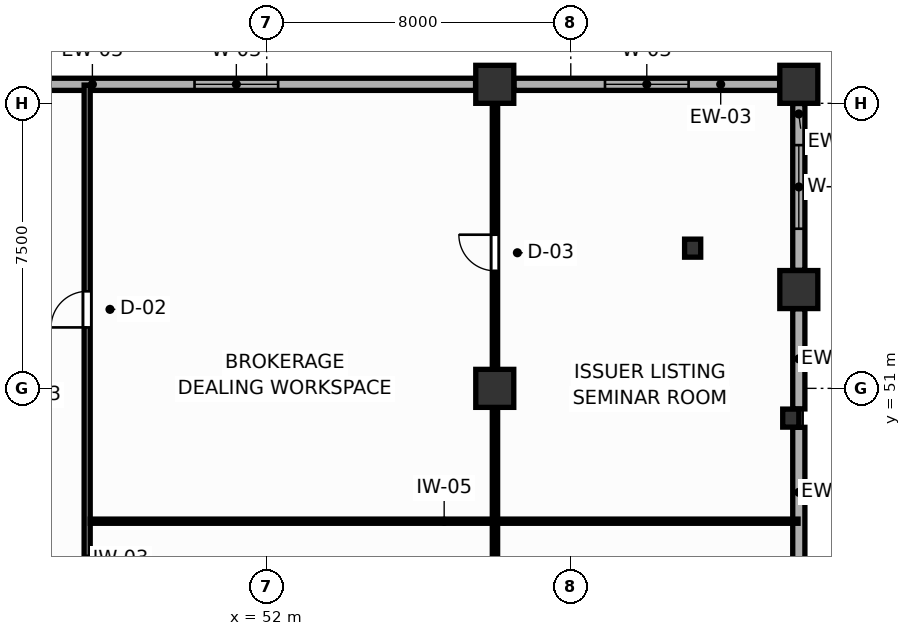
"""IFC4 building model, lengths in metres.
Left out: names, types, materials, properties, quantities, classifications, styles, units other than length and angle.
Written with IfcOpenShell. Run it as: python <this file> out.ifc"""

import sys

from ifc_helpers import new_model, si_unit, direction, frame, frame_2d, origin, origin_2d, place, context, subcontext, project, spatial, rectangle, i_section, extrude, source, transform, mapped, element, fill, save


model = new_model("IFC4")
c1 = context("Model", 3, precision=1e-05, world=origin(), true_north=direction((0.0, 1.0)))
c2 = subcontext(c1, "Body", "Model", "MODEL_VIEW")
j1 = project(units=[si_unit("LENGTHUNIT", "METRE"), si_unit("PLANEANGLEUNIT", "RADIAN")], contexts=[c1])
p1 = place(None, origin())
s1 = spatial("IfcSite", under=j1, at=p1, CompositionType="ELEMENT")
p2 = place(p1, origin())
s2 = spatial("IfcBuilding", under=s1, at=p2, CompositionType="ELEMENT")
p3 = place(p2, frame((0.0, 0.0, 9.6)))
s3 = spatial("IfcBuildingStorey", under=s2, at=p3, CompositionType="ELEMENT", Elevation=9.6)
m1 = source(origin(), c2, "Body", "SweptSolid", [
    extrude(rectangle(XDim=1.0, YDim=1.0, at=origin_2d()), origin(), (0.0, 0.0, 1.0), 4.8),
])
for number, where, z_axis, x_axis in (
    (1, (66.0, 53.6, 0.0), (0.0, 0.0, 1.0), (1.0, 0.0, 0.0)),
    (2, (66.0, 59.0, 0.0), (0.0, 0.0, 1.0), (1.0, 0.0, 0.0)),
    (3, (58.0, 59.0, 0.0), (0.0, 0.0, 1.0), (1.0, 0.0, 0.0)),
    (4, (58.0, 51.0, 0.0), (0.0, 0.0, 1.0), (1.0, 0.0, 0.0)),
):
    element("IfcColumn", number, at=place(p3, frame(where, z_axis=z_axis, x_axis=x_axis)), inside=s3, PredefinedType="COLUMN", context=c2, shape_type="MappedRepresentation", body=[
        mapped(m1, transform((0.0, 0.0, 0.0), scale=1.0)),
    ])
m2 = source(origin(), c2, "Body", "SweptSolid", [
    extrude(i_section(OverallWidth=0.424, OverallDepth=0.474, WebThickness=0.045, FlangeThickness=0.072, FilletRadius=0.015, at=origin_2d()), origin(), (0.0, 0.0, 1.0), 4.8),
])
for number, where, z_axis, x_axis in (
    (5, (65.789, 50.217, 0.0), (0.0, 0.0, 1.0), (1.0, 0.0, 0.0)),
    (6, (63.207, 54.689, 0.0), (0.0, 0.0, 1.0), (1.0, 0.0, 0.0)),
):
    element("IfcColumn", number, at=place(p3, frame(where, z_axis=z_axis, x_axis=x_axis)), inside=s3, PredefinedType="COLUMN", context=c2, shape_type="MappedRepresentation", body=[
        mapped(m2, transform((0.0, 0.0, 0.0), scale=1.0)),
    ])
p4 = place(p3, frame((44.905, 59.0, 0.0), z_axis=(0.0, 0.0, 1.0), x_axis=(1.0, 0.0, 0.0)))
e7 = element("IfcWall", 7, at=p4, inside=s3, PredefinedType="SOLIDWALL", context=c2, shape_type="SweptSolid", body=[
    extrude(rectangle(XDim=12.59, YDim=0.32, at=frame_2d((6.295, 0.0))), origin(), (0.0, 0.0, 1.0), 3.65),
])
p5 = place(p4, frame((5.195, 0.0, 0.75)))
e8 = element("IfcOpeningElement", 8, at=p5, cuts=e7, PredefinedType="OPENING", context=c2, shape_type="SweptSolid", body=[
    extrude(rectangle(XDim=2.2, YDim=2.0, at=frame_2d((1.1, 1.0))), frame((0.0, 0.17, 0.0), z_axis=(0.0, -1.0, 0.0), x_axis=(1.0, 0.0, 0.0)), (0.0, 0.0, 1.0), 0.34),
])
p6 = place(p3, frame((58.505, 59.0, 0.0), z_axis=(0.0, 0.0, 1.0), x_axis=(1.0, 0.0, 0.0)))
e9 = element("IfcWall", 9, at=p6, inside=s3, PredefinedType="SOLIDWALL", context=c2, shape_type="SweptSolid", body=[
    extrude(rectangle(XDim=6.99, YDim=0.32, at=frame_2d((3.495, 0.0))), origin(), (0.0, 0.0, 1.0), 3.65),
])
p7 = place(p6, frame((2.395, 0.0, 0.75)))
e10 = element("IfcOpeningElement", 10, at=p7, cuts=e9, PredefinedType="OPENING", context=c2, shape_type="SweptSolid", body=[
    extrude(rectangle(XDim=2.2, YDim=2.0, at=frame_2d((1.1, 1.0))), frame((0.0, 0.17, 0.0), z_axis=(0.0, -1.0, 0.0), x_axis=(1.0, 0.0, 0.0)), (0.0, 0.0, 1.0), 0.34),
])
p8 = place(p3, frame((66.0, 42.705, 0.0), z_axis=(0.0, 0.0, 1.0), x_axis=(0.0, 1.0, 0.0)))
e11 = element("IfcWall", 11, at=p8, inside=s3, PredefinedType="SOLIDWALL", context=c2, shape_type="SweptSolid", body=[
    extrude(rectangle(XDim=7.27, YDim=0.32, at=frame_2d((3.635, 0.0))), origin(), (0.0, 0.0, 1.0), 4.35),
])
p9 = place(p8, frame((1.468, 0.0, 0.75)))
e12 = element("IfcOpeningElement", 12, at=p9, cuts=e11, PredefinedType="OPENING", context=c2, shape_type="SweptSolid", body=[
    extrude(rectangle(XDim=2.2, YDim=2.0, at=frame_2d((1.1, 1.0))), frame((0.0, 0.17, 0.0), z_axis=(0.0, -1.0, 0.0), x_axis=(1.0, 0.0, 0.0)), (0.0, 0.0, 1.0), 0.34),
])
p10 = place(p3, frame((66.0, 50.459, 0.0), z_axis=(0.0, 0.0, 1.0), x_axis=(0.0, 1.0, 0.0)))
e13 = element("IfcWall", 13, at=p10, inside=s3, PredefinedType="SOLIDWALL", context=c2, shape_type="SweptSolid", body=[
    extrude(rectangle(XDim=2.636, YDim=0.32, at=frame_2d((1.318, 0.0))), origin(), (0.0, 0.0, 1.0), 4.35),
])
p11 = place(p3, frame((66.0, 54.105, 0.0), z_axis=(0.0, 0.0, 1.0), x_axis=(0.0, 1.0, 0.0)))
e14 = element("IfcWall", 14, at=p11, inside=s3, PredefinedType="SOLIDWALL", context=c2, shape_type="SweptSolid", body=[
    extrude(rectangle(XDim=4.39, YDim=0.32, at=frame_2d((2.195, 0.0))), origin(), (0.0, 0.0, 1.0), 4.35),
])
p12 = place(p11, frame((1.095, 0.0, 0.75)))
e15 = element("IfcOpeningElement", 15, at=p12, cuts=e14, PredefinedType="OPENING", context=c2, shape_type="SweptSolid", body=[
    extrude(rectangle(XDim=2.2, YDim=2.0, at=frame_2d((1.1, 1.0))), frame((0.0, 0.17, 0.0), z_axis=(0.0, -1.0, 0.0), x_axis=(1.0, 0.0, 0.0)), (0.0, 0.0, 1.0), 0.34),
])
p13 = place(p3, frame((47.275, 32.27, 0.0), z_axis=(0.0, 0.0, 1.0), x_axis=(0.0, 1.0, 0.0)))
e16 = element("IfcWall", 16, at=p13, inside=s3, PredefinedType="PARTITIONING", context=c2, shape_type="SweptSolid", body=[
    extrude(rectangle(XDim=26.71, YDim=0.16, at=frame_2d((13.355, 0.0))), origin(), (0.0, 0.0, 1.0), 4.35),
])
p14 = place(p13, frame((7.195, 0.0, 0.0)))
e17 = element("IfcOpeningElement", 17, at=p14, cuts=e16, PredefinedType="OPENING", context=c2, shape_type="SweptSolid", body=[
    extrude(rectangle(XDim=0.95, YDim=2.05, at=frame_2d((0.475, 1.025))), frame((0.0, 0.09, 0.0), z_axis=(0.0, -1.0, 0.0), x_axis=(1.0, 0.0, 0.0)), (0.0, 0.0, 1.0), 0.18),
])
p15 = place(p13, frame((20.333, 0.0, 0.0)))
e18 = element("IfcOpeningElement", 18, at=p15, cuts=e16, PredefinedType="OPENING", context=c2, shape_type="SweptSolid", body=[
    extrude(rectangle(XDim=0.95, YDim=2.05, at=frame_2d((0.475, 1.025))), frame((0.0, 0.09, 0.0), z_axis=(0.0, -1.0, 0.0), x_axis=(1.0, 0.0, 0.0)), (0.0, 0.0, 1.0), 0.18),
])
p16 = place(p3, frame((58.005, 32.357, 0.0), z_axis=(0.0, 0.0, 1.0), x_axis=(0.0, 1.0, 0.0)))
e19 = element("IfcWall", 19, at=p16, inside=s3, PredefinedType="PARTITIONING", context=c2, shape_type="SweptSolid", body=[
    extrude(rectangle(XDim=26.623, YDim=0.14, at=frame_2d((13.312, 0.0))), origin(), (0.0, 0.0, 1.0), 4.35),
])
p17 = place(p16, frame((3.522, 0.0, 0.0)))
e20 = element("IfcOpeningElement", 20, at=p17, cuts=e19, PredefinedType="OPENING", context=c2, shape_type="SweptSolid", body=[
    extrude(rectangle(XDim=0.95, YDim=2.05, at=frame_2d((0.475, 1.025))), frame((0.0, 0.08, 0.0), z_axis=(0.0, -1.0, 0.0), x_axis=(1.0, 0.0, 0.0)), (0.0, 0.0, 1.0), 0.16),
])
p18 = place(p16, frame((21.736, 0.0, 0.0)))
e21 = element("IfcOpeningElement", 21, at=p18, cuts=e19, PredefinedType="OPENING", context=c2, shape_type="SweptSolid", body=[
    extrude(rectangle(XDim=0.95, YDim=2.05, at=frame_2d((0.475, 1.025))), frame((0.0, 0.08, 0.0), z_axis=(0.0, -1.0, 0.0), x_axis=(1.0, 0.0, 0.0)), (0.0, 0.0, 1.0), 0.16),
])
p19 = place(p3, frame((47.357, 47.505, 0.0), z_axis=(0.0, 0.0, 1.0), x_axis=(1.0, 0.0, 0.0)))
e22 = element("IfcWall", 22, at=p19, inside=s3, PredefinedType="MOVABLE", context=c2, shape_type="SweptSolid", body=[
    extrude(rectangle(XDim=18.623, YDim=0.11, at=frame_2d((9.312, 0.0))), origin(), (0.0, 0.0, 1.0), 4.35),
])
p20 = place(p5, origin())
e23 = element("IfcWindow", 23, at=p20, inside=s3, PartitioningType="SINGLE_PANEL", PredefinedType="WINDOW", context=c2, shape_type="SweptSolid", body=[
    extrude(rectangle(XDim=2.2, YDim=2.0, at=frame_2d((1.1, 1.0))), frame((0.0, 0.03, 0.0), z_axis=(0.0, -1.0, 0.0), x_axis=(1.0, 0.0, 0.0)), (0.0, 0.0, 1.0), 0.06),
])
fill(e8, e23)
p21 = place(p7, origin())
e24 = element("IfcWindow", 24, at=p21, inside=s3, PartitioningType="SINGLE_PANEL", PredefinedType="WINDOW", context=c2, shape_type="SweptSolid", body=[
    extrude(rectangle(XDim=2.2, YDim=2.0, at=frame_2d((1.1, 1.0))), frame((0.0, 0.03, 0.0), z_axis=(0.0, -1.0, 0.0), x_axis=(1.0, 0.0, 0.0)), (0.0, 0.0, 1.0), 0.06),
])
fill(e10, e24)
p22 = place(p12, origin())
e25 = element("IfcWindow", 25, at=p22, inside=s3, PartitioningType="SINGLE_PANEL", PredefinedType="WINDOW", context=c2, shape_type="SweptSolid", body=[
    extrude(rectangle(XDim=2.2, YDim=2.0, at=frame_2d((1.1, 1.0))), frame((0.0, 0.03, 0.0), z_axis=(0.0, -1.0, 0.0), x_axis=(1.0, 0.0, 0.0)), (0.0, 0.0, 1.0), 0.06),
])
fill(e15, e25)
p23 = place(p15, origin())
e26 = element("IfcDoor", 26, at=p23, inside=s3, OperationType="SINGLE_SWING_LEFT", PredefinedType="DOOR", context=c2, shape_type="SweptSolid", body=[
    extrude(rectangle(XDim=0.95, YDim=2.05, at=frame_2d((0.475, 1.025))), frame((0.0, 0.025, 0.0), z_axis=(0.0, -1.0, 0.0), x_axis=(1.0, 0.0, 0.0)), (0.0, 0.0, 1.0), 0.05),
])
fill(e18, e26)
p24 = place(p18, origin())
e27 = element("IfcDoor", 27, at=p24, inside=s3, OperationType="SINGLE_SWING_RIGHT", PredefinedType="DOOR", context=c2, shape_type="SweptSolid", body=[
    extrude(rectangle(XDim=0.95, YDim=2.05, at=frame_2d((0.475, 1.025))), frame((0.0, 0.025, 0.0), z_axis=(0.0, -1.0, 0.0), x_axis=(1.0, 0.0, 0.0)), (0.0, 0.0, 1.0), 0.05),
])
fill(e21, e27)
save(model, sys.argv[1])
